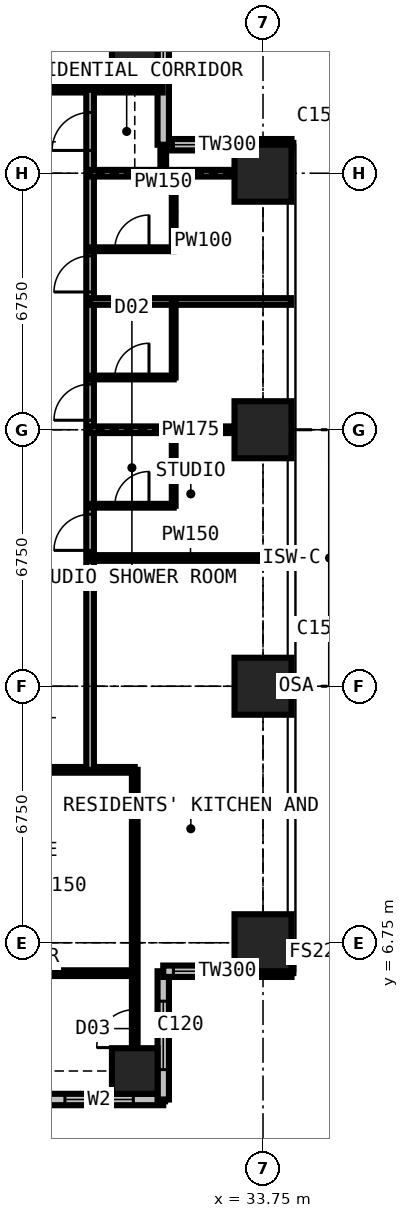
"""IFC4 building model, lengths in metres.
Left out: names, types, materials, properties, quantities, classifications, styles, units other than length and angle.
Written with IfcOpenShell. Run it as: python <this file> out.ifc"""

import sys

from ifc_helpers import new_model, si_unit, direction, frame, frame_2d, origin, origin_2d, place, context, subcontext, project, spatial, rectangle, extrude, element, fill, save


model = new_model("IFC4")
c1 = context("Model", 3, precision=1e-05, world=origin(), true_north=direction((0.0, 1.0)))
c2 = subcontext(c1, "Body", "Model", "MODEL_VIEW")
j1 = project(units=[si_unit("LENGTHUNIT", "METRE"), si_unit("PLANEANGLEUNIT", "RADIAN")], contexts=[c1])
p1 = place(None, origin())
s1 = spatial("IfcSite", under=j1, at=p1, CompositionType="ELEMENT")
p2 = place(p1, origin())
s2 = spatial("IfcBuilding", under=s1, at=p2, CompositionType="ELEMENT")
p3 = place(p2, frame((0.0, 0.0, 167.4)))
s3 = spatial("IfcBuildingStorey", under=s2, at=p3, CompositionType="ELEMENT", Elevation=167.4)
for number, where, z_axis, x_axis in (
    (1, (30.375, 3.375, 0.0), (0.0, 0.0, 1.0), (1.0, 0.0, 0.0)),
    (2, (30.375, 30.375, 0.0), (0.0, 0.0, 1.0), (1.0, 0.0, 0.0)),
):
    element("IfcColumn", number, at=place(p3, frame(where, z_axis=z_axis, x_axis=x_axis)), inside=s3, PredefinedType="COLUMN", context=c2, shape_type="SweptSolid", body=[
        extrude(rectangle(XDim=1.2, YDim=1.2, at=origin_2d()), origin(), (0.0, 0.0, 1.0), 3.6),
    ])
for number, where, z_axis, x_axis in (
    (3, (33.75, 6.75, 0.0), (0.0, 0.0, 1.0), (1.0, 0.0, 0.0)),
    (4, (33.75, 13.5, 0.0), (0.0, 0.0, 1.0), (1.0, 0.0, 0.0)),
    (5, (33.75, 20.25, 0.0), (0.0, 0.0, 1.0), (1.0, 0.0, 0.0)),
    (6, (33.75, 27.0, 0.0), (0.0, 0.0, 1.0), (1.0, 0.0, 0.0)),
):
    element("IfcColumn", number, at=place(p3, frame(where, z_axis=z_axis, x_axis=x_axis)), inside=s3, PredefinedType="COLUMN", context=c2, shape_type="SweptSolid", body=[
        extrude(rectangle(XDim=1.5, YDim=1.5, at=origin_2d()), origin(), (0.0, 0.0, 1.0), 3.6),
    ])
p4 = place(p3, frame((34.5, 27.75, 0.0), z_axis=(0.0, 0.0, 1.0), x_axis=(-1.0, 0.0, 0.0)))
e7 = element("IfcWall", 7, at=p4, inside=s3, PredefinedType="SOLIDWALL", context=c2, shape_type="SweptSolid", body=[
    extrude(rectangle(XDim=3.375, YDim=0.3, at=frame_2d((1.688, 0.0))), origin(), (0.0, 0.0, 1.0), 3.375),
])
p5 = place(p4, frame((1.607, 0.0, 0.9)))
e8 = element("IfcOpeningElement", 8, at=p5, cuts=e7, PredefinedType="OPENING", context=c2, shape_type="SweptSolid", body=[
    extrude(rectangle(XDim=1.5, YDim=1.8, at=frame_2d((0.75, 0.9))), frame((0.0, 0.16, 0.0), z_axis=(0.0, -1.0, 0.0), x_axis=(1.0, 0.0, 0.0)), (0.0, 0.0, 1.0), 0.32),
])
p6 = place(p3, frame((31.125, 27.75, 0.0), z_axis=(0.0, 0.0, 1.0), x_axis=(0.0, 1.0, 0.0)))
e9 = element("IfcWall", 9, at=p6, inside=s3, PredefinedType="SOLIDWALL", context=c2, shape_type="SweptSolid", body=[
    extrude(rectangle(XDim=3.375, YDim=0.3, at=frame_2d((1.688, 0.0))), origin(), (0.0, 0.0, 1.0), 3.375),
])
p7 = place(p6, frame((1.663, 0.0, 0.9)))
e10 = element("IfcOpeningElement", 10, at=p7, cuts=e9, PredefinedType="OPENING", context=c2, shape_type="SweptSolid", body=[
    extrude(rectangle(XDim=1.5, YDim=1.8, at=frame_2d((0.75, 0.9))), frame((0.0, 0.16, 0.0), z_axis=(0.0, -1.0, 0.0), x_axis=(1.0, 0.0, 0.0)), (0.0, 0.0, 1.0), 0.32),
])
p8 = place(p3, frame((27.75, 2.625, 0.0), z_axis=(0.0, 0.0, 1.0), x_axis=(1.0, 0.0, 0.0)))
e11 = element("IfcWall", 11, at=p8, inside=s3, PredefinedType="SOLIDWALL", context=c2, shape_type="SweptSolid", body=[
    extrude(rectangle(XDim=3.375, YDim=0.3, at=frame_2d((1.688, 0.0))), origin(), (0.0, 0.0, 1.0), 3.375),
])
p9 = place(p8, frame((0.788, 0.0, 0.6)))
e12 = element("IfcOpeningElement", 12, at=p9, cuts=e11, PredefinedType="OPENING", context=c2, shape_type="SweptSolid", body=[
    extrude(rectangle(XDim=1.8, YDim=2.1, at=frame_2d((0.9, 1.05))), frame((0.0, 0.16, 0.0), z_axis=(0.0, -1.0, 0.0), x_axis=(1.0, 0.0, 0.0)), (0.0, 0.0, 1.0), 0.32),
])
p10 = place(p3, frame((31.125, 2.625, 0.0), z_axis=(0.0, 0.0, 1.0), x_axis=(0.0, 1.0, 0.0)))
e13 = element("IfcWall", 13, at=p10, inside=s3, PredefinedType="SOLIDWALL", context=c2, shape_type="SweptSolid", body=[
    extrude(rectangle(XDim=3.375, YDim=0.3, at=frame_2d((1.688, 0.0))), origin(), (0.0, 0.0, 1.0), 3.375),
])
p11 = place(p10, frame((0.788, 0.0, 0.6)))
e14 = element("IfcOpeningElement", 14, at=p11, cuts=e13, PredefinedType="OPENING", context=c2, shape_type="SweptSolid", body=[
    extrude(rectangle(XDim=1.8, YDim=2.1, at=frame_2d((0.9, 1.05))), frame((0.0, 0.16, 0.0), z_axis=(0.0, -1.0, 0.0), x_axis=(1.0, 0.0, 0.0)), (0.0, 0.0, 1.0), 0.32),
])
p12 = place(p3, frame((31.125, 6.0, 0.0), z_axis=(0.0, 0.0, 1.0), x_axis=(1.0, 0.0, 0.0)))
e15 = element("IfcWall", 15, at=p12, inside=s3, PredefinedType="SOLIDWALL", context=c2, shape_type="SweptSolid", body=[
    extrude(rectangle(XDim=3.375, YDim=0.3, at=frame_2d((1.688, 0.0))), origin(), (0.0, 0.0, 1.0), 3.375),
])
p13 = place(p12, frame((0.268, 0.0, 0.9)))
e16 = element("IfcOpeningElement", 16, at=p13, cuts=e15, PredefinedType="OPENING", context=c2, shape_type="SweptSolid", body=[
    extrude(rectangle(XDim=1.5, YDim=1.8, at=frame_2d((0.75, 0.9))), frame((0.0, 0.16, 0.0), z_axis=(0.0, -1.0, 0.0), x_axis=(1.0, 0.0, 0.0)), (0.0, 0.0, 1.0), 0.32),
])
p14 = place(p3, frame((10.125, 11.3, 0.0), z_axis=(0.0, 0.0, 1.0), x_axis=(1.0, 0.0, 0.0)))
e17 = element("IfcWall", 17, at=p14, inside=s3, PredefinedType="PARTITIONING", context=c2, shape_type="SweptSolid", body=[
    extrude(rectangle(XDim=20.25, YDim=0.15, at=frame_2d((10.125, 0.0))), origin(), (0.0, 0.0, 1.0), 3.375),
])
p15 = place(p14, frame((8.375, 0.0, 0.0)))
e18 = element("IfcOpeningElement", 18, at=p15, cuts=e17, PredefinedType="OPENING", context=c2, shape_type="SweptSolid", body=[
    extrude(rectangle(XDim=1.0, YDim=2.2, at=frame_2d((0.5, 1.1))), frame((0.0, 0.085, 0.0), z_axis=(0.0, -1.0, 0.0), x_axis=(1.0, 0.0, 0.0)), (0.0, 0.0, 1.0), 0.17),
])
p16 = place(p14, frame((10.975, 0.0, 0.0)))
e19 = element("IfcOpeningElement", 19, at=p16, cuts=e17, PredefinedType="OPENING", context=c2, shape_type="SweptSolid", body=[
    extrude(rectangle(XDim=1.0, YDim=2.2, at=frame_2d((0.5, 1.1))), frame((0.0, 0.085, 0.0), z_axis=(0.0, -1.0, 0.0), x_axis=(1.0, 0.0, 0.0)), (0.0, 0.0, 1.0), 0.17),
])
p17 = place(p14, frame((4.875, 0.0, 0.0)))
e20 = element("IfcOpeningElement", 20, at=p17, cuts=e17, PredefinedType="OPENING", context=c2, shape_type="SweptSolid", body=[
    extrude(rectangle(XDim=0.95, YDim=2.2, at=frame_2d((0.475, 1.1))), frame((0.0, 0.085, 0.0), z_axis=(0.0, -1.0, 0.0), x_axis=(1.0, 0.0, 0.0)), (0.0, 0.0, 1.0), 0.17),
])
p18 = place(p3, frame((11.3, 29.2, 0.0), z_axis=(0.0, 0.0, 1.0), x_axis=(1.0, 0.0, 0.0)))
e21 = element("IfcWall", 21, at=p18, inside=s3, PredefinedType="PARTITIONING", context=c2, shape_type="SweptSolid", body=[
    extrude(rectangle(XDim=19.809, YDim=0.15, at=frame_2d((9.904, 0.0))), origin(), (0.0, 0.0, 1.0), 3.375),
])
p19 = place(p18, frame((12.9, 0.0, 0.0)))
e22 = element("IfcOpeningElement", 22, at=p19, cuts=e21, PredefinedType="OPENING", context=c2, shape_type="SweptSolid", body=[
    extrude(rectangle(XDim=1.0, YDim=2.2, at=frame_2d((0.5, 1.1))), frame((0.0, 0.085, 0.0), z_axis=(0.0, -1.0, 0.0), x_axis=(1.0, 0.0, 0.0)), (0.0, 0.0, 1.0), 0.17),
])
p20 = place(p18, frame((5.825, 0.0, 0.0)))
e23 = element("IfcOpeningElement", 23, at=p20, cuts=e21, PredefinedType="OPENING", context=c2, shape_type="SweptSolid", body=[
    extrude(rectangle(XDim=0.95, YDim=2.2, at=frame_2d((0.475, 1.1))), frame((0.0, 0.085, 0.0), z_axis=(0.0, -1.0, 0.0), x_axis=(1.0, 0.0, 0.0)), (0.0, 0.0, 1.0), 0.17),
])
p21 = place(p18, frame((0.6, 0.0, 0.0)))
e24 = element("IfcOpeningElement", 24, at=p21, cuts=e21, PredefinedType="OPENING", context=c2, shape_type="SweptSolid", body=[
    extrude(rectangle(XDim=1.0, YDim=2.2, at=frame_2d((0.5, 1.1))), frame((0.0, 0.085, 0.0), z_axis=(0.0, -1.0, 0.0), x_axis=(1.0, 0.0, 0.0)), (0.0, 0.0, 1.0), 0.17),
])
p22 = place(p3, frame((27.725, 5.95, 0.0), z_axis=(0.0, 0.0, 1.0), x_axis=(1.0, 0.0, 0.0)))
e25 = element("IfcWall", 25, at=p22, inside=s3, PredefinedType="PARTITIONING", context=c2, shape_type="SweptSolid", body=[
    extrude(rectangle(XDim=2.65, YDim=0.15, at=frame_2d((1.325, 0.0))), origin(), (0.0, 0.0, 1.0), 3.375),
])
p23 = place(p3, frame((29.2, 11.3, 0.0), z_axis=(0.0, 0.0, 1.0), x_axis=(0.0, 1.0, 0.0)))
e26 = element("IfcWall", 26, at=p23, inside=s3, PredefinedType="PARTITIONING", context=c2, shape_type="SweptSolid", body=[
    extrude(rectangle(XDim=17.9, YDim=0.2, at=frame_2d((8.95, 0.0))), origin(), (0.0, 0.0, 1.0), 3.375),
])
p24 = place(p23, frame((5.775, 0.0, 0.0)))
e27 = element("IfcOpeningElement", 27, at=p24, cuts=e26, PredefinedType="OPENING", context=c2, shape_type="SweptSolid", body=[
    extrude(rectangle(XDim=0.95, YDim=2.2, at=frame_2d((0.475, 1.1))), frame((0.0, 0.11, 0.0), z_axis=(0.0, -1.0, 0.0), x_axis=(1.0, 0.0, 0.0)), (0.0, 0.0, 1.0), 0.22),
])
p25 = place(p23, frame((9.2, 0.0, 0.0)))
e28 = element("IfcOpeningElement", 28, at=p25, cuts=e26, PredefinedType="OPENING", context=c2, shape_type="SweptSolid", body=[
    extrude(rectangle(XDim=0.95, YDim=2.2, at=frame_2d((0.475, 1.1))), frame((0.0, 0.11, 0.0), z_axis=(0.0, -1.0, 0.0), x_axis=(1.0, 0.0, 0.0)), (0.0, 0.0, 1.0), 0.22),
])
p26 = place(p23, frame((12.575, 0.0, 0.0)))
e29 = element("IfcOpeningElement", 29, at=p26, cuts=e26, PredefinedType="OPENING", context=c2, shape_type="SweptSolid", body=[
    extrude(rectangle(XDim=0.95, YDim=2.2, at=frame_2d((0.475, 1.1))), frame((0.0, 0.11, 0.0), z_axis=(0.0, -1.0, 0.0), x_axis=(1.0, 0.0, 0.0)), (0.0, 0.0, 1.0), 0.22),
])
p27 = place(p23, frame((16.3, 0.0, 0.0)))
e30 = element("IfcOpeningElement", 30, at=p27, cuts=e26, PredefinedType="OPENING", context=c2, shape_type="SweptSolid", body=[
    extrude(rectangle(XDim=1.0, YDim=2.2, at=frame_2d((0.5, 1.1))), frame((0.0, 0.11, 0.0), z_axis=(0.0, -1.0, 0.0), x_axis=(1.0, 0.0, 0.0)), (0.0, 0.0, 1.0), 0.22),
])
p28 = place(p3, frame((29.2, 16.875, 0.0), z_axis=(0.0, 0.0, 1.0), x_axis=(1.0, 0.0, 0.0)))
e31 = element("IfcWall", 31, at=p28, inside=s3, PredefinedType="PARTITIONING", context=c2, shape_type="SweptSolid", body=[
    extrude(rectangle(XDim=5.284, YDim=0.15, at=frame_2d((2.642, 0.0))), origin(), (0.0, 0.0, 1.0), 3.375),
])
p29 = place(p3, frame((29.2, 18.25, 0.0), z_axis=(0.0, 0.0, 1.0), x_axis=(1.0, 0.0, 0.0)))
e32 = element("IfcWall", 32, at=p29, inside=s3, PredefinedType="PARTITIONING", context=c2, shape_type="SweptSolid", body=[
    extrude(rectangle(XDim=2.2, YDim=0.1, at=frame_2d((1.1, 0.0))), origin(), (0.0, 0.0, 1.0), 3.375),
])
p30 = place(p29, frame((0.65, 0.0, 0.0)))
e33 = element("IfcOpeningElement", 33, at=p30, cuts=e32, PredefinedType="OPENING", context=c2, shape_type="SweptSolid", body=[
    extrude(rectangle(XDim=0.9, YDim=2.2, at=frame_2d((0.45, 1.1))), frame((0.0, 0.06, 0.0), z_axis=(0.0, -1.0, 0.0), x_axis=(1.0, 0.0, 0.0)), (0.0, 0.0, 1.0), 0.12),
])
p31 = place(p3, frame((29.2, 20.25, 0.0), z_axis=(0.0, 0.0, 1.0), x_axis=(1.0, 0.0, 0.0)))
e34 = element("IfcWall", 34, at=p31, inside=s3, PredefinedType="PARTITIONING", context=c2, shape_type="SweptSolid", body=[
    extrude(rectangle(XDim=5.284, YDim=0.175, at=frame_2d((2.642, 0.0))), origin(), (0.0, 0.0, 1.0), 2.61),
])
p32 = place(p3, frame((29.2, 21.625, 0.0), z_axis=(0.0, 0.0, 1.0), x_axis=(1.0, 0.0, 0.0)))
e35 = element("IfcWall", 35, at=p32, inside=s3, PredefinedType="PARTITIONING", context=c2, shape_type="SweptSolid", body=[
    extrude(rectangle(XDim=2.2, YDim=0.1, at=frame_2d((1.1, 0.0))), origin(), (0.0, 0.0, 1.0), 3.375),
])
p33 = place(p32, frame((0.65, 0.0, 0.0)))
e36 = element("IfcOpeningElement", 36, at=p33, cuts=e35, PredefinedType="OPENING", context=c2, shape_type="SweptSolid", body=[
    extrude(rectangle(XDim=0.9, YDim=2.2, at=frame_2d((0.45, 1.1))), frame((0.0, 0.06, 0.0), z_axis=(0.0, -1.0, 0.0), x_axis=(1.0, 0.0, 0.0)), (0.0, 0.0, 1.0), 0.12),
])
p34 = place(p3, frame((29.2, 23.625, 0.0), z_axis=(0.0, 0.0, 1.0), x_axis=(1.0, 0.0, 0.0)))
e37 = element("IfcWall", 37, at=p34, inside=s3, PredefinedType="PARTITIONING", context=c2, shape_type="SweptSolid", body=[
    extrude(rectangle(XDim=5.284, YDim=0.175, at=frame_2d((2.642, 0.0))), origin(), (0.0, 0.0, 1.0), 3.375),
])
p35 = place(p3, frame((29.2, 25.0, 0.0), z_axis=(0.0, 0.0, 1.0), x_axis=(1.0, 0.0, 0.0)))
e38 = element("IfcWall", 38, at=p35, inside=s3, PredefinedType="PARTITIONING", context=c2, shape_type="SweptSolid", body=[
    extrude(rectangle(XDim=2.2, YDim=0.1, at=frame_2d((1.1, 0.0))), origin(), (0.0, 0.0, 1.0), 3.375),
])
p36 = place(p35, frame((0.65, 0.0, 0.0)))
e39 = element("IfcOpeningElement", 39, at=p36, cuts=e38, PredefinedType="OPENING", context=c2, shape_type="SweptSolid", body=[
    extrude(rectangle(XDim=0.9, YDim=2.2, at=frame_2d((0.45, 1.1))), frame((0.0, 0.06, 0.0), z_axis=(0.0, -1.0, 0.0), x_axis=(1.0, 0.0, 0.0)), (0.0, 0.0, 1.0), 0.12),
])
p37 = place(p3, frame((29.2, 27.0, 0.0), z_axis=(0.0, 0.0, 1.0), x_axis=(1.0, 0.0, 0.0)))
e40 = element("IfcWall", 40, at=p37, inside=s3, PredefinedType="PARTITIONING", context=c2, shape_type="SweptSolid", body=[
    extrude(rectangle(XDim=5.284, YDim=0.175, at=frame_2d((2.642, 0.0))), origin(), (0.0, 0.0, 1.0), 2.806),
])
p38 = place(p3, frame((30.375, 2.775, 0.0), z_axis=(0.0, 0.0, 1.0), x_axis=(0.0, 1.0, 0.0)))
e41 = element("IfcWall", 41, at=p38, inside=s3, PredefinedType="PARTITIONING", context=c2, shape_type="SweptSolid", body=[
    extrude(rectangle(XDim=8.525, YDim=0.15, at=frame_2d((4.263, 0.0))), origin(), (0.0, 0.0, 1.0), 2.877),
])
p39 = place(p38, frame((1.216, 0.0, 0.0)))
e42 = element("IfcOpeningElement", 42, at=p39, cuts=e41, PredefinedType="OPENING", context=c2, shape_type="SweptSolid", body=[
    extrude(rectangle(XDim=1.0, YDim=2.2, at=frame_2d((0.5, 1.1))), frame((0.0, 0.085, 0.0), z_axis=(0.0, -1.0, 0.0), x_axis=(1.0, 0.0, 0.0)), (0.0, 0.0, 1.0), 0.17),
])
p40 = place(p3, frame((31.125, 27.0, 0.0), z_axis=(0.0, 0.0, 1.0), x_axis=(0.0, 1.0, 0.0)))
e43 = element("IfcWall", 43, at=p40, inside=s3, PredefinedType="PARTITIONING", context=c2, shape_type="SweptSolid", body=[
    extrude(rectangle(XDim=0.734, YDim=0.15, at=frame_2d((0.367, 0.0))), origin(), (0.0, 0.0, 1.0), 3.375),
])
for number, where, z_axis, x_axis in (
    (44, (31.4, 18.25, 0.0), (0.0, 0.0, 1.0), (0.0, 1.0, 0.0)),
    (45, (31.4, 21.625, 0.0), (0.0, 0.0, 1.0), (0.0, 1.0, 0.0)),
    (46, (31.4, 25.0, 0.0), (0.0, 0.0, 1.0), (0.0, 1.0, 0.0)),
):
    element("IfcWall", number, at=place(p3, frame(where, z_axis=z_axis, x_axis=x_axis)), inside=s3, PredefinedType="PARTITIONING", context=c2, shape_type="SweptSolid", body=[
        extrude(rectangle(XDim=2.0, YDim=0.1, at=frame_2d((1.0, 0.0))), origin(), (0.0, 0.0, 1.0), 3.375),
    ])
p41 = place(p5, origin())
e47 = element("IfcWindow", 47, at=p41, inside=s3, PartitioningType="SINGLE_PANEL", PredefinedType="WINDOW", context=c2, shape_type="SweptSolid", body=[
    extrude(rectangle(XDim=1.5, YDim=1.8, at=frame_2d((0.75, 0.9))), frame((0.0, 0.03, 0.0), z_axis=(0.0, -1.0, 0.0), x_axis=(1.0, 0.0, 0.0)), (0.0, 0.0, 1.0), 0.06),
])
fill(e8, e47)
p42 = place(p7, origin())
e48 = element("IfcWindow", 48, at=p42, inside=s3, PartitioningType="SINGLE_PANEL", PredefinedType="WINDOW", context=c2, shape_type="SweptSolid", body=[
    extrude(rectangle(XDim=1.5, YDim=1.8, at=frame_2d((0.75, 0.9))), frame((0.0, 0.03, 0.0), z_axis=(0.0, -1.0, 0.0), x_axis=(1.0, 0.0, 0.0)), (0.0, 0.0, 1.0), 0.06),
])
fill(e10, e48)
p43 = place(p9, origin())
e49 = element("IfcWindow", 49, at=p43, inside=s3, PartitioningType="SINGLE_PANEL", PredefinedType="WINDOW", context=c2, shape_type="SweptSolid", body=[
    extrude(rectangle(XDim=1.8, YDim=2.1, at=frame_2d((0.9, 1.05))), frame((0.0, 0.03, 0.0), z_axis=(0.0, -1.0, 0.0), x_axis=(1.0, 0.0, 0.0)), (0.0, 0.0, 1.0), 0.06),
])
fill(e12, e49)
p44 = place(p11, origin())
e50 = element("IfcWindow", 50, at=p44, inside=s3, PartitioningType="SINGLE_PANEL", PredefinedType="WINDOW", context=c2, shape_type="SweptSolid", body=[
    extrude(rectangle(XDim=1.8, YDim=2.1, at=frame_2d((0.9, 1.05))), frame((0.0, 0.03, 0.0), z_axis=(0.0, -1.0, 0.0), x_axis=(1.0, 0.0, 0.0)), (0.0, 0.0, 1.0), 0.06),
])
fill(e14, e50)
p45 = place(p13, origin())
e51 = element("IfcWindow", 51, at=p45, inside=s3, PartitioningType="SINGLE_PANEL", PredefinedType="WINDOW", context=c2, shape_type="SweptSolid", body=[
    extrude(rectangle(XDim=1.5, YDim=1.8, at=frame_2d((0.75, 0.9))), frame((0.0, 0.03, 0.0), z_axis=(0.0, -1.0, 0.0), x_axis=(1.0, 0.0, 0.0)), (0.0, 0.0, 1.0), 0.06),
])
fill(e16, e51)
p46 = place(p39, origin())
e52 = element("IfcDoor", 52, at=p46, inside=s3, OperationType="SINGLE_SWING_LEFT", PredefinedType="DOOR", context=c2, shape_type="SweptSolid", body=[
    extrude(rectangle(XDim=1.0, YDim=2.2, at=frame_2d((0.5, 1.1))), frame((0.0, 0.025, 0.0), z_axis=(0.0, -1.0, 0.0), x_axis=(1.0, 0.0, 0.0)), (0.0, 0.0, 1.0), 0.05),
])
fill(e42, e52)
p47 = place(p24, origin())
e53 = element("IfcDoor", 53, at=p47, inside=s3, OperationType="SINGLE_SWING_LEFT", PredefinedType="DOOR", context=c2, shape_type="SweptSolid", body=[
    extrude(rectangle(XDim=0.95, YDim=2.2, at=frame_2d((0.475, 1.1))), frame((0.0, 0.025, 0.0), z_axis=(0.0, -1.0, 0.0), x_axis=(1.0, 0.0, 0.0)), (0.0, 0.0, 1.0), 0.05),
])
fill(e27, e53)
p48 = place(p30, origin())
e54 = element("IfcDoor", 54, at=p48, inside=s3, OperationType="SINGLE_SWING_RIGHT", PredefinedType="DOOR", context=c2, shape_type="SweptSolid", body=[
    extrude(rectangle(XDim=0.9, YDim=2.2, at=frame_2d((0.45, 1.1))), frame((0.0, 0.025, 0.0), z_axis=(0.0, -1.0, 0.0), x_axis=(1.0, 0.0, 0.0)), (0.0, 0.0, 1.0), 0.05),
])
fill(e33, e54)
p49 = place(p25, origin())
e55 = element("IfcDoor", 55, at=p49, inside=s3, OperationType="SINGLE_SWING_LEFT", PredefinedType="DOOR", context=c2, shape_type="SweptSolid", body=[
    extrude(rectangle(XDim=0.95, YDim=2.2, at=frame_2d((0.475, 1.1))), frame((0.0, 0.025, 0.0), z_axis=(0.0, -1.0, 0.0), x_axis=(1.0, 0.0, 0.0)), (0.0, 0.0, 1.0), 0.05),
])
fill(e28, e55)
p50 = place(p33, origin())
e56 = element("IfcDoor", 56, at=p50, inside=s3, OperationType="SINGLE_SWING_RIGHT", PredefinedType="DOOR", context=c2, shape_type="SweptSolid", body=[
    extrude(rectangle(XDim=0.9, YDim=2.2, at=frame_2d((0.45, 1.1))), frame((0.0, 0.025, 0.0), z_axis=(0.0, -1.0, 0.0), x_axis=(1.0, 0.0, 0.0)), (0.0, 0.0, 1.0), 0.05),
])
fill(e36, e56)
p51 = place(p26, origin())
e57 = element("IfcDoor", 57, at=p51, inside=s3, OperationType="SINGLE_SWING_LEFT", PredefinedType="DOOR", context=c2, shape_type="SweptSolid", body=[
    extrude(rectangle(XDim=0.95, YDim=2.2, at=frame_2d((0.475, 1.1))), frame((0.0, 0.025, 0.0), z_axis=(0.0, -1.0, 0.0), x_axis=(1.0, 0.0, 0.0)), (0.0, 0.0, 1.0), 0.05),
])
fill(e29, e57)
p52 = place(p36, origin())
e58 = element("IfcDoor", 58, at=p52, inside=s3, OperationType="SINGLE_SWING_RIGHT", PredefinedType="DOOR", context=c2, shape_type="SweptSolid", body=[
    extrude(rectangle(XDim=0.9, YDim=2.2, at=frame_2d((0.45, 1.1))), frame((0.0, 0.025, 0.0), z_axis=(0.0, -1.0, 0.0), x_axis=(1.0, 0.0, 0.0)), (0.0, 0.0, 1.0), 0.05),
])
fill(e39, e58)
p53 = place(p27, origin())
e59 = element("IfcDoor", 59, at=p53, inside=s3, OperationType="SINGLE_SWING_LEFT", PredefinedType="DOOR", context=c2, shape_type="SweptSolid", body=[
    extrude(rectangle(XDim=1.0, YDim=2.2, at=frame_2d((0.5, 1.1))), frame((0.0, 0.025, 0.0), z_axis=(0.0, -1.0, 0.0), x_axis=(1.0, 0.0, 0.0)), (0.0, 0.0, 1.0), 0.05),
])
fill(e30, e59)
save(model, sys.argv[1])
